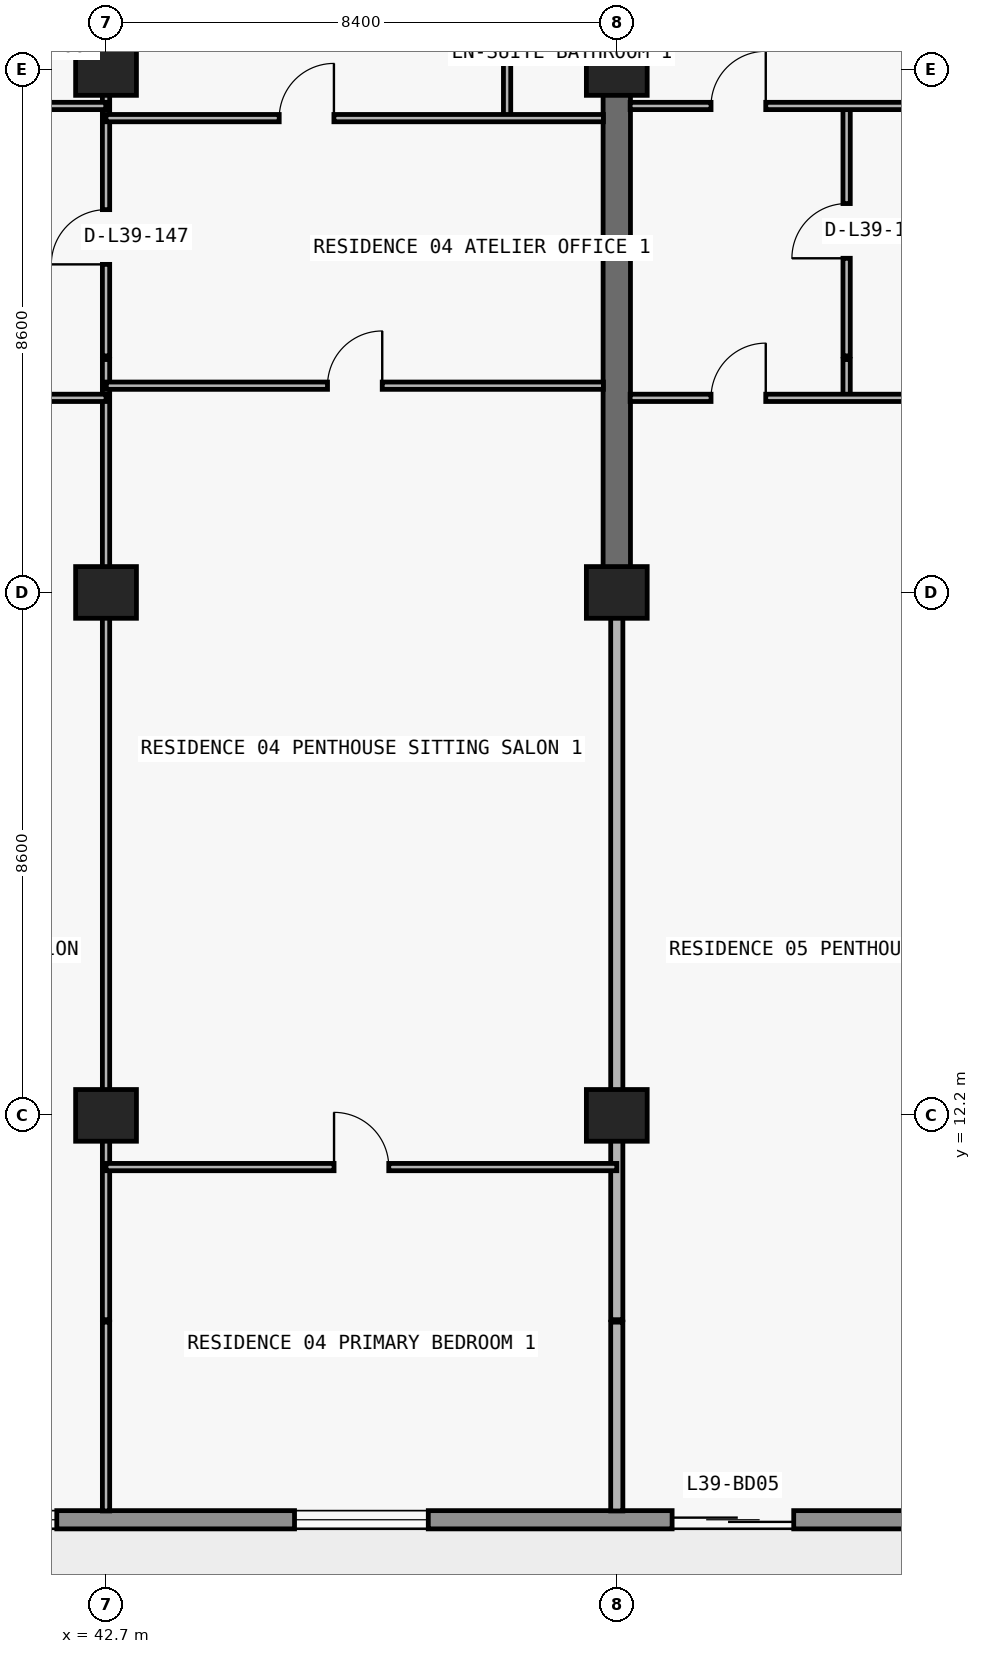
"""IFC4 building model, lengths in metres.
Left out: names, types, materials, properties, quantities, classifications, styles, units other than length and angle.
Written with IfcOpenShell. Run it as: python <this file> out.ifc"""

import sys

from ifc_helpers import new_model, si_unit, direction, frame, frame_2d, origin, origin_2d, place, context, subcontext, project, spatial, rectangle, extrude, element, fill, save


model = new_model("IFC4")
c1 = context("Model", 3, precision=1e-05, world=origin(), true_north=direction((0.0, 1.0)))
c2 = subcontext(c1, "Body", "Model", "MODEL_VIEW")
j1 = project(units=[si_unit("LENGTHUNIT", "METRE"), si_unit("PLANEANGLEUNIT", "RADIAN")], contexts=[c1])
p1 = place(None, origin())
s1 = spatial("IfcSite", under=j1, at=p1, CompositionType="ELEMENT")
p2 = place(p1, origin())
s2 = spatial("IfcBuilding", under=s1, at=p2, CompositionType="ELEMENT")
p3 = place(p2, frame((0.0, 0.0, 142.2)))
s3 = spatial("IfcBuildingStorey", under=s2, at=p3, CompositionType="ELEMENT", Elevation=142.2)
for number, where, z_axis, x_axis in (
    (1, (42.7, 12.2, 0.0), (0.0, 0.0, 1.0), (1.0, 0.0, 0.0)),
    (2, (51.1, 12.2, 0.0), (0.0, 0.0, 1.0), (1.0, 0.0, 0.0)),
    (3, (42.7, 20.8, 0.0), (0.0, 0.0, 1.0), (1.0, 0.0, 0.0)),
    (4, (51.1, 20.8, 0.0), (0.0, 0.0, 1.0), (1.0, 0.0, 0.0)),
    (5, (42.7, 29.4, 0.0), (0.0, 0.0, 1.0), (1.0, 0.0, 0.0)),
    (6, (51.1, 29.4, 0.0), (0.0, 0.0, 1.0), (1.0, 0.0, 0.0)),
):
    element("IfcColumn", number, at=place(p3, frame(where, z_axis=z_axis, x_axis=x_axis)), inside=s3, PredefinedType="COLUMN", context=c2, shape_type="SweptSolid", body=[
        extrude(rectangle(XDim=1.0, YDim=0.85, at=origin_2d()), origin(), (0.0, 0.0, 1.0), 3.05),
    ])
p4 = place(p3, frame((51.1, 20.8, 0.0), z_axis=(0.0, 0.0, 1.0), x_axis=(0.0, 1.0, 0.0)))
e7 = element("IfcWall", 7, at=p4, inside=s3, PredefinedType="SHEAR", context=c2, shape_type="SweptSolid", body=[
    extrude(rectangle(XDim=8.6, YDim=0.45, at=frame_2d((4.3, 0.0))), origin(), (0.0, 0.0, 1.0), 3.05),
])
p5 = place(p3, frame((70.1, 5.55, 0.0), z_axis=(0.0, 0.0, 1.0), x_axis=(-1.0, 0.0, 0.0)))
e8 = element("IfcWall", 8, at=p5, inside=s3, PredefinedType="STANDARD", context=c2, shape_type="SweptSolid", body=[
    extrude(rectangle(XDim=62.4, YDim=0.3, at=frame_2d((31.2, 0.0))), origin(), (0.0, 0.0, 1.0), 3.05),
])
p6 = place(p5, frame((57.226, 0.0, 0.0)))
e9 = element("IfcOpeningElement", 9, at=p6, cuts=e8, PredefinedType="OPENING", context=c2, shape_type="SweptSolid", body=[
    extrude(rectangle(XDim=2.0, YDim=2.3, at=frame_2d((1.0, 1.15))), frame((0.0, 0.16, 0.0), z_axis=(0.0, -1.0, 0.0), x_axis=(1.0, 0.0, 0.0)), (0.0, 0.0, 1.0), 0.32),
])
p7 = place(p5, frame((52.926, 0.0, 0.85)))
e10 = element("IfcOpeningElement", 10, at=p7, cuts=e8, PredefinedType="OPENING", context=c2, shape_type="SweptSolid", body=[
    extrude(rectangle(XDim=2.2, YDim=1.55, at=frame_2d((1.1, 0.775))), frame((0.0, 0.16, 0.0), z_axis=(0.0, -1.0, 0.0), x_axis=(1.0, 0.0, 0.0)), (0.0, 0.0, 1.0), 0.32),
])
p8 = place(p5, frame((48.49, 0.0, 0.0)))
e11 = element("IfcOpeningElement", 11, at=p8, cuts=e8, PredefinedType="OPENING", context=c2, shape_type="SweptSolid", body=[
    extrude(rectangle(XDim=2.0, YDim=2.3, at=frame_2d((1.0, 1.15))), frame((0.0, 0.16, 0.0), z_axis=(0.0, -1.0, 0.0), x_axis=(1.0, 0.0, 0.0)), (0.0, 0.0, 1.0), 0.32),
])
p9 = place(p5, frame((44.39, 0.0, 0.85)))
e12 = element("IfcOpeningElement", 12, at=p9, cuts=e8, PredefinedType="OPENING", context=c2, shape_type="SweptSolid", body=[
    extrude(rectangle(XDim=1.8, YDim=1.55, at=frame_2d((0.9, 0.775))), frame((0.0, 0.16, 0.0), z_axis=(0.0, -1.0, 0.0), x_axis=(1.0, 0.0, 0.0)), (0.0, 0.0, 1.0), 0.32),
])
p10 = place(p5, frame((40.426, 0.0, 0.0)))
e13 = element("IfcOpeningElement", 13, at=p10, cuts=e8, PredefinedType="OPENING", context=c2, shape_type="SweptSolid", body=[
    extrude(rectangle(XDim=2.0, YDim=2.3, at=frame_2d((1.0, 1.15))), frame((0.0, 0.16, 0.0), z_axis=(0.0, -1.0, 0.0), x_axis=(1.0, 0.0, 0.0)), (0.0, 0.0, 1.0), 0.32),
])
p11 = place(p5, frame((36.126, 0.0, 0.85)))
e14 = element("IfcOpeningElement", 14, at=p11, cuts=e8, PredefinedType="OPENING", context=c2, shape_type="SweptSolid", body=[
    extrude(rectangle(XDim=2.2, YDim=1.55, at=frame_2d((1.1, 0.775))), frame((0.0, 0.16, 0.0), z_axis=(0.0, -1.0, 0.0), x_axis=(1.0, 0.0, 0.0)), (0.0, 0.0, 1.0), 0.32),
])
p12 = place(p5, frame((32.09, 0.0, 0.0)))
e15 = element("IfcOpeningElement", 15, at=p12, cuts=e8, PredefinedType="OPENING", context=c2, shape_type="SweptSolid", body=[
    extrude(rectangle(XDim=2.0, YDim=2.3, at=frame_2d((1.0, 1.15))), frame((0.0, 0.16, 0.0), z_axis=(0.0, -1.0, 0.0), x_axis=(1.0, 0.0, 0.0)), (0.0, 0.0, 1.0), 0.32),
])
p13 = place(p5, frame((28.21, 0.0, 0.65)))
e16 = element("IfcOpeningElement", 16, at=p13, cuts=e8, PredefinedType="OPENING", context=c2, shape_type="SweptSolid", body=[
    extrude(rectangle(XDim=2.6, YDim=1.85, at=frame_2d((1.3, 0.925))), frame((0.0, 0.16, 0.0), z_axis=(0.0, -1.0, 0.0), x_axis=(1.0, 0.0, 0.0)), (0.0, 0.0, 1.0), 0.32),
])
p14 = place(p5, frame((22.1, 0.0, 0.85)))
e17 = element("IfcOpeningElement", 17, at=p14, cuts=e8, PredefinedType="OPENING", context=c2, shape_type="SweptSolid", body=[
    extrude(rectangle(XDim=2.2, YDim=1.55, at=frame_2d((1.1, 0.775))), frame((0.0, 0.16, 0.0), z_axis=(0.0, -1.0, 0.0), x_axis=(1.0, 0.0, 0.0)), (0.0, 0.0, 1.0), 0.32),
])
p15 = place(p5, frame((16.09, 0.0, 0.0)))
e18 = element("IfcOpeningElement", 18, at=p15, cuts=e8, PredefinedType="OPENING", context=c2, shape_type="SweptSolid", body=[
    extrude(rectangle(XDim=2.0, YDim=2.3, at=frame_2d((1.0, 1.15))), frame((0.0, 0.16, 0.0), z_axis=(0.0, -1.0, 0.0), x_axis=(1.0, 0.0, 0.0)), (0.0, 0.0, 1.0), 0.32),
])
p16 = place(p5, frame((11.41, 0.0, 0.65)))
e19 = element("IfcOpeningElement", 19, at=p16, cuts=e8, PredefinedType="OPENING", context=c2, shape_type="SweptSolid", body=[
    extrude(rectangle(XDim=2.6, YDim=1.85, at=frame_2d((1.3, 0.925))), frame((0.0, 0.16, 0.0), z_axis=(0.0, -1.0, 0.0), x_axis=(1.0, 0.0, 0.0)), (0.0, 0.0, 1.0), 0.32),
])
p17 = place(p5, frame((5.3, 0.0, 0.85)))
e20 = element("IfcOpeningElement", 20, at=p17, cuts=e8, PredefinedType="OPENING", context=c2, shape_type="SweptSolid", body=[
    extrude(rectangle(XDim=2.2, YDim=1.55, at=frame_2d((1.1, 0.775))), frame((0.0, 0.16, 0.0), z_axis=(0.0, -1.0, 0.0), x_axis=(1.0, 0.0, 0.0)), (0.0, 0.0, 1.0), 0.32),
])
p18 = place(p3, frame((42.7, 5.695, 0.0), z_axis=(0.0, 0.0, 1.0), x_axis=(0.0, 1.0, 0.0)))
e21 = element("IfcWall", 21, at=p18, inside=s3, PredefinedType="PARTITIONING", context=c2, shape_type="SweptSolid", body=[
    extrude(rectangle(XDim=3.105, YDim=0.12, at=frame_2d((1.552, 0.0))), origin(), (0.0, 0.0, 1.0), 3.05),
])
p19 = place(p3, frame((42.7, 8.84, 0.0), z_axis=(0.0, 0.0, 1.0), x_axis=(0.0, 1.0, 0.0)))
e22 = element("IfcWall", 22, at=p19, inside=s3, PredefinedType="PARTITIONING", context=c2, shape_type="SweptSolid", body=[
    extrude(rectangle(XDim=15.79, YDim=0.12, at=frame_2d((7.895, 0.0))), origin(), (0.0, 0.0, 1.0), 2.174),
])
p20 = place(p3, frame((42.7, 24.69, 0.0), z_axis=(0.0, 0.0, 1.0), x_axis=(0.0, 1.0, 0.0)))
e23 = element("IfcWall", 23, at=p20, inside=s3, PredefinedType="PARTITIONING", context=c2, shape_type="SweptSolid", body=[
    extrude(rectangle(XDim=5.09, YDim=0.12, at=frame_2d((2.545, 0.0))), origin(), (0.0, 0.0, 1.0), 2.174),
])
p21 = place(p20, frame((1.505, 0.0, 0.0)))
e24 = element("IfcOpeningElement", 24, at=p21, cuts=e23, PredefinedType="OPENING", context=c2, shape_type="SweptSolid", body=[
    extrude(rectangle(XDim=0.9, YDim=2.124, at=frame_2d((0.45, 1.062))), frame((0.0, 0.07, 0.0), z_axis=(0.0, -1.0, 0.0), x_axis=(1.0, 0.0, 0.0)), (0.0, 0.0, 1.0), 0.14),
])
p22 = place(p3, frame((49.296, 28.6, 0.0), z_axis=(0.0, 0.0, 1.0), x_axis=(0.0, 1.0, 0.0)))
e25 = element("IfcWall", 25, at=p22, inside=s3, PredefinedType="PARTITIONING", context=c2, shape_type="SweptSolid", body=[
    extrude(rectangle(XDim=1.18, YDim=0.12, at=frame_2d((0.59, 0.0))), origin(), (0.0, 0.0, 1.0), 3.05),
])
p23 = place(p3, frame((51.1, 5.695, 0.0), z_axis=(0.0, 0.0, 1.0), x_axis=(0.0, 1.0, 0.0)))
e26 = element("IfcWall", 26, at=p23, inside=s3, PredefinedType="PARTITIONING", context=c2, shape_type="SweptSolid", body=[
    extrude(rectangle(XDim=3.105, YDim=0.2, at=frame_2d((1.552, 0.0))), origin(), (0.0, 0.0, 1.0), 3.05),
])
p24 = place(p3, frame((51.1, 8.84, 0.0), z_axis=(0.0, 0.0, 1.0), x_axis=(0.0, 1.0, 0.0)))
e27 = element("IfcWall", 27, at=p24, inside=s3, PredefinedType="PARTITIONING", context=c2, shape_type="SweptSolid", body=[
    extrude(rectangle(XDim=11.955, YDim=0.2, at=frame_2d((5.978, 0.0))), origin(), (0.0, 0.0, 1.0), 2.174),
])
p25 = place(p3, frame((51.1, 29.405, 0.0), z_axis=(0.0, 0.0, 1.0), x_axis=(0.0, 1.0, 0.0)))
e28 = element("IfcWall", 28, at=p25, inside=s3, PredefinedType="PARTITIONING", context=c2, shape_type="SweptSolid", body=[
    extrude(rectangle(XDim=0.375, YDim=0.2, at=frame_2d((0.188, 0.0))), origin(), (0.0, 0.0, 1.0), 3.05),
])
p26 = place(p3, frame((54.88, 24.0, 0.0), z_axis=(0.0, 0.0, 1.0), x_axis=(0.0, 1.0, 0.0)))
e29 = element("IfcWall", 29, at=p26, inside=s3, PredefinedType="PARTITIONING", context=c2, shape_type="SweptSolid", body=[
    extrude(rectangle(XDim=0.63, YDim=0.12, at=frame_2d((0.315, 0.0))), origin(), (0.0, 0.0, 1.0), 3.05),
])
p27 = place(p3, frame((54.88, 24.69, 0.0), z_axis=(0.0, 0.0, 1.0), x_axis=(0.0, 1.0, 0.0)))
e30 = element("IfcWall", 30, at=p27, inside=s3, PredefinedType="PARTITIONING", context=c2, shape_type="SweptSolid", body=[
    extrude(rectangle(XDim=4.11, YDim=0.12, at=frame_2d((2.055, 0.0))), origin(), (0.0, 0.0, 1.0), 3.05),
])
p28 = place(p27, frame((1.605, 0.0, 0.0)))
e31 = element("IfcOpeningElement", 31, at=p28, cuts=e30, PredefinedType="OPENING", context=c2, shape_type="SweptSolid", body=[
    extrude(rectangle(XDim=0.9, YDim=2.15, at=frame_2d((0.45, 1.075))), frame((0.0, 0.07, 0.0), z_axis=(0.0, -1.0, 0.0), x_axis=(1.0, 0.0, 0.0)), (0.0, 0.0, 1.0), 0.14),
])
p29 = place(p3, frame((42.7, 11.35, 0.0), z_axis=(0.0, 0.0, 1.0), x_axis=(1.0, 0.0, 0.0)))
e32 = element("IfcWall", 32, at=p29, inside=s3, PredefinedType="PARTITIONING", context=c2, shape_type="SweptSolid", body=[
    extrude(rectangle(XDim=8.4, YDim=0.12, at=frame_2d((4.2, 0.0))), origin(), (0.0, 0.0, 1.0), 3.05),
])
p30 = place(p29, frame((3.75, 0.0, 0.0)))
e33 = element("IfcOpeningElement", 33, at=p30, cuts=e32, PredefinedType="OPENING", context=c2, shape_type="SweptSolid", body=[
    extrude(rectangle(XDim=0.9, YDim=2.15, at=frame_2d((0.45, 1.075))), frame((0.0, 0.07, 0.0), z_axis=(0.0, -1.0, 0.0), x_axis=(1.0, 0.0, 0.0)), (0.0, 0.0, 1.0), 0.14),
])
p31 = place(p3, frame((35.1, 24.0, 0.0), z_axis=(0.0, 0.0, 1.0), x_axis=(1.0, 0.0, 0.0)))
e34 = element("IfcWall", 34, at=p31, inside=s3, PredefinedType="PARTITIONING", context=c2, shape_type="SweptSolid", body=[
    extrude(rectangle(XDim=7.6, YDim=0.12, at=frame_2d((3.8, 0.0))), origin(), (0.0, 0.0, 1.0), 3.05),
])
p32 = place(p31, frame((3.35, 0.0, 0.0)))
e35 = element("IfcOpeningElement", 35, at=p32, cuts=e34, PredefinedType="OPENING", context=c2, shape_type="SweptSolid", body=[
    extrude(rectangle(XDim=0.9, YDim=2.15, at=frame_2d((0.45, 1.075))), frame((0.0, 0.07, 0.0), z_axis=(0.0, -1.0, 0.0), x_axis=(1.0, 0.0, 0.0)), (0.0, 0.0, 1.0), 0.14),
])
p33 = place(p3, frame((51.32, 24.0, 0.0), z_axis=(0.0, 0.0, 1.0), x_axis=(1.0, 0.0, 0.0)))
e36 = element("IfcWall", 36, at=p33, inside=s3, PredefinedType="PARTITIONING", context=c2, shape_type="SweptSolid", body=[
    extrude(rectangle(XDim=8.18, YDim=0.12, at=frame_2d((4.09, 0.0))), origin(), (0.0, 0.0, 1.0), 3.05),
])
p34 = place(p33, frame((1.33, 0.0, 0.0)))
e37 = element("IfcOpeningElement", 37, at=p34, cuts=e36, PredefinedType="OPENING", context=c2, shape_type="SweptSolid", body=[
    extrude(rectangle(XDim=0.9, YDim=2.15, at=frame_2d((0.45, 1.075))), frame((0.0, 0.07, 0.0), z_axis=(0.0, -1.0, 0.0), x_axis=(1.0, 0.0, 0.0)), (0.0, 0.0, 1.0), 0.14),
])
p35 = place(p3, frame((42.705, 24.2, 0.0), z_axis=(0.0, 0.0, 1.0), x_axis=(1.0, 0.0, 0.0)))
e38 = element("IfcWall", 38, at=p35, inside=s3, PredefinedType="PARTITIONING", context=c2, shape_type="SweptSolid", body=[
    extrude(rectangle(XDim=8.175, YDim=0.12, at=frame_2d((4.087, 0.0))), origin(), (0.0, 0.0, 1.0), 3.05),
])
p36 = place(p35, frame((3.637, 0.0, 0.0)))
e39 = element("IfcOpeningElement", 39, at=p36, cuts=e38, PredefinedType="OPENING", context=c2, shape_type="SweptSolid", body=[
    extrude(rectangle(XDim=0.9, YDim=2.15, at=frame_2d((0.45, 1.075))), frame((0.0, 0.07, 0.0), z_axis=(0.0, -1.0, 0.0), x_axis=(1.0, 0.0, 0.0)), (0.0, 0.0, 1.0), 0.14),
])
p37 = place(p3, frame((42.7, 28.6, 0.0), z_axis=(0.0, 0.0, 1.0), x_axis=(1.0, 0.0, 0.0)))
e40 = element("IfcWall", 40, at=p37, inside=s3, PredefinedType="PARTITIONING", context=c2, shape_type="SweptSolid", body=[
    extrude(rectangle(XDim=8.18, YDim=0.12, at=frame_2d((4.09, 0.0))), origin(), (0.0, 0.0, 1.0), 3.05),
])
p38 = place(p37, frame((2.848, 0.0, 0.0)))
e41 = element("IfcOpeningElement", 41, at=p38, cuts=e40, PredefinedType="OPENING", context=c2, shape_type="SweptSolid", body=[
    extrude(rectangle(XDim=0.9, YDim=2.15, at=frame_2d((0.45, 1.075))), frame((0.0, 0.07, 0.0), z_axis=(0.0, -1.0, 0.0), x_axis=(1.0, 0.0, 0.0)), (0.0, 0.0, 1.0), 0.14),
])
p39 = place(p3, frame((35.1, 28.8, 0.0), z_axis=(0.0, 0.0, 1.0), x_axis=(1.0, 0.0, 0.0)))
e42 = element("IfcWall", 42, at=p39, inside=s3, PredefinedType="PARTITIONING", context=c2, shape_type="SweptSolid", body=[
    extrude(rectangle(XDim=7.595, YDim=0.12, at=frame_2d((3.797, 0.0))), origin(), (0.0, 0.0, 1.0), 3.05),
])
p40 = place(p39, frame((2.442, 0.0, 0.0)))
e43 = element("IfcOpeningElement", 43, at=p40, cuts=e42, PredefinedType="OPENING", context=c2, shape_type="SweptSolid", body=[
    extrude(rectangle(XDim=0.9, YDim=2.15, at=frame_2d((0.45, 1.075))), frame((0.0, 0.07, 0.0), z_axis=(0.0, -1.0, 0.0), x_axis=(1.0, 0.0, 0.0)), (0.0, 0.0, 1.0), 0.14),
])
p41 = place(p3, frame((51.32, 28.8, 0.0), z_axis=(0.0, 0.0, 1.0), x_axis=(1.0, 0.0, 0.0)))
e44 = element("IfcWall", 44, at=p41, inside=s3, PredefinedType="PARTITIONING", context=c2, shape_type="SweptSolid", body=[
    extrude(rectangle(XDim=8.18, YDim=0.12, at=frame_2d((4.09, 0.0))), origin(), (0.0, 0.0, 1.0), 3.05),
])
p42 = place(p41, frame((1.33, 0.0, 0.0)))
e45 = element("IfcOpeningElement", 45, at=p42, cuts=e44, PredefinedType="OPENING", context=c2, shape_type="SweptSolid", body=[
    extrude(rectangle(XDim=0.9, YDim=2.15, at=frame_2d((0.45, 1.075))), frame((0.0, 0.07, 0.0), z_axis=(0.0, -1.0, 0.0), x_axis=(1.0, 0.0, 0.0)), (0.0, 0.0, 1.0), 0.14),
])
p43 = place(p13, origin())
e46 = element("IfcWindow", 46, at=p43, inside=s3, PartitioningType="SINGLE_PANEL", PredefinedType="WINDOW", context=c2, shape_type="SweptSolid", body=[
    extrude(rectangle(XDim=2.6, YDim=1.85, at=frame_2d((1.3, 0.925))), frame((0.0, 0.03, 0.0), z_axis=(0.0, -1.0, 0.0), x_axis=(1.0, 0.0, 0.0)), (0.0, 0.0, 1.0), 0.06),
])
fill(e16, e46)
p44 = place(p14, origin())
e47 = element("IfcWindow", 47, at=p44, inside=s3, PartitioningType="SINGLE_PANEL", PredefinedType="WINDOW", context=c2, shape_type="SweptSolid", body=[
    extrude(rectangle(XDim=2.2, YDim=1.55, at=frame_2d((1.1, 0.775))), frame((0.0, 0.03, 0.0), z_axis=(0.0, -1.0, 0.0), x_axis=(1.0, 0.0, 0.0)), (0.0, 0.0, 1.0), 0.06),
])
fill(e17, e47)
p45 = place(p15, origin())
e48 = element("IfcDoor", 48, at=p45, inside=s3, OperationType="DOUBLE_DOOR_SLIDING", PredefinedType="DOOR", context=c2, shape_type="SweptSolid", body=[
    extrude(rectangle(XDim=2.0, YDim=2.3, at=frame_2d((1.0, 1.15))), frame((0.0, 0.025, 0.0), z_axis=(0.0, -1.0, 0.0), x_axis=(1.0, 0.0, 0.0)), (0.0, 0.0, 1.0), 0.05),
])
fill(e18, e48)
p46 = place(p21, origin())
e49 = element("IfcDoor", 49, at=p46, inside=s3, OperationType="SINGLE_SWING_LEFT", PredefinedType="DOOR", context=c2, shape_type="SweptSolid", body=[
    extrude(rectangle(XDim=0.9, YDim=2.124, at=frame_2d((0.45, 1.062))), frame((0.0, 0.025, 0.0), z_axis=(0.0, -1.0, 0.0), x_axis=(1.0, 0.0, 0.0)), (0.0, 0.0, 1.0), 0.05),
])
fill(e24, e49)
p47 = place(p38, origin())
e50 = element("IfcDoor", 50, at=p47, inside=s3, OperationType="SINGLE_SWING_RIGHT", PredefinedType="DOOR", context=c2, shape_type="SweptSolid", body=[
    extrude(rectangle(XDim=0.9, YDim=2.15, at=frame_2d((0.45, 1.075))), frame((0.0, 0.025, 0.0), z_axis=(0.0, -1.0, 0.0), x_axis=(1.0, 0.0, 0.0)), (0.0, 0.0, 1.0), 0.05),
])
fill(e41, e50)
p48 = place(p36, origin())
e51 = element("IfcDoor", 51, at=p48, inside=s3, OperationType="SINGLE_SWING_RIGHT", PredefinedType="DOOR", context=c2, shape_type="SweptSolid", body=[
    extrude(rectangle(XDim=0.9, YDim=2.15, at=frame_2d((0.45, 1.075))), frame((0.0, 0.025, 0.0), z_axis=(0.0, -1.0, 0.0), x_axis=(1.0, 0.0, 0.0)), (0.0, 0.0, 1.0), 0.05),
])
fill(e39, e51)
p49 = place(p30, origin())
e52 = element("IfcDoor", 52, at=p49, inside=s3, OperationType="SINGLE_SWING_LEFT", PredefinedType="DOOR", context=c2, shape_type="SweptSolid", body=[
    extrude(rectangle(XDim=0.9, YDim=2.15, at=frame_2d((0.45, 1.075))), frame((0.0, 0.025, 0.0), z_axis=(0.0, -1.0, 0.0), x_axis=(1.0, 0.0, 0.0)), (0.0, 0.0, 1.0), 0.05),
])
fill(e33, e52)
p50 = place(p42, origin())
e53 = element("IfcDoor", 53, at=p50, inside=s3, OperationType="SINGLE_SWING_RIGHT", PredefinedType="DOOR", context=c2, shape_type="SweptSolid", body=[
    extrude(rectangle(XDim=0.9, YDim=2.15, at=frame_2d((0.45, 1.075))), frame((0.0, 0.025, 0.0), z_axis=(0.0, -1.0, 0.0), x_axis=(1.0, 0.0, 0.0)), (0.0, 0.0, 1.0), 0.05),
])
fill(e45, e53)
p51 = place(p28, origin())
e54 = element("IfcDoor", 54, at=p51, inside=s3, OperationType="SINGLE_SWING_LEFT", PredefinedType="DOOR", context=c2, shape_type="SweptSolid", body=[
    extrude(rectangle(XDim=0.9, YDim=2.15, at=frame_2d((0.45, 1.075))), frame((0.0, 0.025, 0.0), z_axis=(0.0, -1.0, 0.0), x_axis=(1.0, 0.0, 0.0)), (0.0, 0.0, 1.0), 0.05),
])
fill(e31, e54)
p52 = place(p34, origin())
e55 = element("IfcDoor", 55, at=p52, inside=s3, OperationType="SINGLE_SWING_RIGHT", PredefinedType="DOOR", context=c2, shape_type="SweptSolid", body=[
    extrude(rectangle(XDim=0.9, YDim=2.15, at=frame_2d((0.45, 1.075))), frame((0.0, 0.025, 0.0), z_axis=(0.0, -1.0, 0.0), x_axis=(1.0, 0.0, 0.0)), (0.0, 0.0, 1.0), 0.05),
])
fill(e37, e55)
save(model, sys.argv[1])
